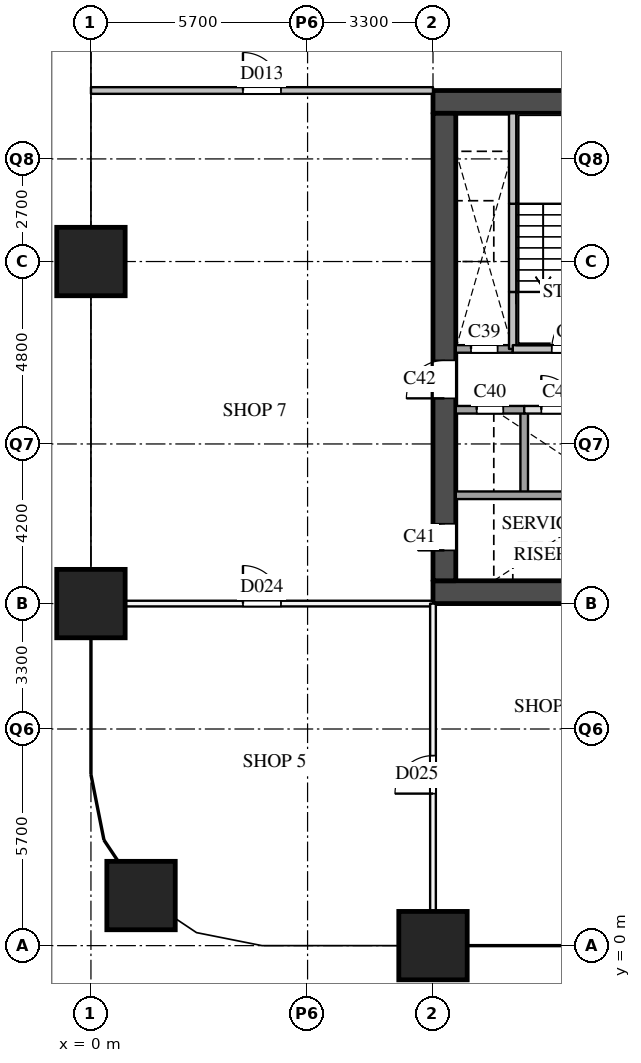
"""IFC4 building model, lengths in metres.
Left out: names, types, materials, properties, quantities, classifications, styles, units other than length and angle.
Written with IfcOpenShell. Run it as: python <this file> out.ifc"""

import sys

from ifc_helpers import new_model, si_unit, direction, frame, frame_2d, origin, origin_2d, place, context, subcontext, project, spatial, rectangle, extrude, element, fill, save


model = new_model("IFC4")
c1 = context("Model", 3, precision=1e-05, world=origin(), true_north=direction((0.0, 1.0)))
c2 = subcontext(c1, "Body", "Model", "MODEL_VIEW")
j1 = project(units=[si_unit("LENGTHUNIT", "METRE"), si_unit("PLANEANGLEUNIT", "RADIAN")], contexts=[c1])
p1 = place(None, origin())
s1 = spatial("IfcSite", under=j1, at=p1, CompositionType="ELEMENT")
p2 = place(p1, origin())
s2 = spatial("IfcBuilding", under=s1, at=p2, CompositionType="ELEMENT")
p3 = place(p2, frame((0.0, 0.0, 8.0)))
s3 = spatial("IfcBuildingStorey", under=s2, at=p3, CompositionType="ELEMENT", Elevation=8.0)
for number, where, z_axis, x_axis in (
    (1, (1.318, 1.318, 0.0), (0.0, 0.0, 1.0), (1.0, 0.0, 0.0)),
    (2, (0.0, 9.0, 0.0), (0.0, 0.0, 1.0), (1.0, 0.0, 0.0)),
    (3, (0.0, 18.0, 0.0), (0.0, 0.0, 1.0), (1.0, 0.0, 0.0)),
    (4, (9.0, 0.0, 0.0), (0.0, 0.0, 1.0), (1.0, 0.0, 0.0)),
):
    element("IfcColumn", number, at=place(p3, frame(where, z_axis=z_axis, x_axis=x_axis)), inside=s3, PredefinedType="COLUMN", context=c2, shape_type="SweptSolid", body=[
        extrude(rectangle(XDim=1.8, YDim=1.8, at=origin_2d()), origin(), (0.0, 0.0, 1.0), 6.0),
    ])
for number, where, z_axis, x_axis in (
    (5, (9.0, 9.3, 0.0), (0.0, 0.0, 1.0), (1.0, 0.0, 0.0)),
    (6, (9.0, 22.2, 0.0), (0.0, 0.0, 1.0), (1.0, 0.0, 0.0)),
):
    element("IfcWall", number, at=place(p3, frame(where, z_axis=z_axis, x_axis=x_axis)), inside=s3, PredefinedType="SHEAR", context=c2, shape_type="SweptSolid", body=[
        extrude(rectangle(XDim=9.0, YDim=0.6, at=frame_2d((4.5, 0.0))), origin(), (0.0, 0.0, 1.0), 5.59),
    ])
p4 = place(p3, frame((9.3, 9.6, 0.0), z_axis=(0.0, 0.0, 1.0), x_axis=(0.0, 1.0, 0.0)))
e7 = element("IfcWall", 7, at=p4, inside=s3, PredefinedType="SHEAR", context=c2, shape_type="SweptSolid", body=[
    extrude(rectangle(XDim=12.3, YDim=0.6, at=frame_2d((6.15, 0.0))), origin(), (0.0, 0.0, 1.0), 5.59),
])
p5 = place(p4, frame((0.8, 0.0, 0.0)))
e8 = element("IfcOpeningElement", 8, at=p5, cuts=e7, PredefinedType="OPENING", context=c2, shape_type="SweptSolid", body=[
    extrude(rectangle(XDim=0.7, YDim=2.1, at=frame_2d((0.35, 1.05))), frame((0.0, 0.31, 0.0), z_axis=(0.0, -1.0, 0.0), x_axis=(1.0, 0.0, 0.0)), (0.0, 0.0, 1.0), 0.62),
])
p6 = place(p4, frame((4.8, 0.0, 0.0)))
e9 = element("IfcOpeningElement", 9, at=p6, cuts=e7, PredefinedType="OPENING", context=c2, shape_type="SweptSolid", body=[
    extrude(rectangle(XDim=1.0, YDim=2.1, at=frame_2d((0.5, 1.05))), frame((0.0, 0.31, 0.0), z_axis=(0.0, -1.0, 0.0), x_axis=(1.0, 0.0, 0.0)), (0.0, 0.0, 1.0), 0.62),
])
p7 = place(p3, frame((11.1, 15.7, 0.0), z_axis=(0.0, 0.0, 1.0), x_axis=(0.0, 1.0, 0.0)))
e10 = element("IfcWall", 10, at=p7, inside=s3, PredefinedType="SOLIDWALL", context=c2, shape_type="SweptSolid", body=[
    extrude(rectangle(XDim=1.5, YDim=0.2, at=frame_2d((0.75, 0.0))), origin(), (0.0, 0.0, 1.0), 5.59),
])
p8 = place(p3, frame((11.1, 17.2, 0.0), z_axis=(0.0, 0.0, 1.0), x_axis=(0.0, 1.0, 0.0)))
e11 = element("IfcWall", 11, at=p8, inside=s3, PredefinedType="SOLIDWALL", context=c2, shape_type="SweptSolid", body=[
    extrude(rectangle(XDim=2.32, YDim=0.2, at=frame_2d((1.16, 0.0))), origin(), (0.0, 0.0, 1.0), 5.59),
])
p9 = place(p3, frame((11.1, 19.52, 0.0), z_axis=(0.0, 0.0, 1.0), x_axis=(0.0, 1.0, 0.0)))
e12 = element("IfcWall", 12, at=p9, inside=s3, PredefinedType="SOLIDWALL", context=c2, shape_type="SweptSolid", body=[
    extrude(rectangle(XDim=2.38, YDim=0.2, at=frame_2d((1.19, 0.0))), origin(), (0.0, 0.0, 1.0), 5.59),
])
p10 = place(p3, frame((11.4, 11.9, 0.0), z_axis=(0.0, 0.0, 1.0), x_axis=(0.0, 1.0, 0.0)))
e13 = element("IfcWall", 13, at=p10, inside=s3, PredefinedType="SOLIDWALL", context=c2, shape_type="SweptSolid", body=[
    extrude(rectangle(XDim=2.2, YDim=0.2, at=frame_2d((1.1, 0.0))), origin(), (0.0, 0.0, 1.0), 5.59),
])
p11 = place(p3, frame((9.6, 11.85, 0.0), z_axis=(0.0, 0.0, 1.0), x_axis=(1.0, 0.0, 0.0)))
e14 = element("IfcWall", 14, at=p11, inside=s3, PredefinedType="SOLIDWALL", context=c2, shape_type="SweptSolid", body=[
    extrude(rectangle(XDim=7.8, YDim=0.2, at=frame_2d((3.9, 0.0))), origin(), (0.0, 0.0, 1.0), 5.59),
])
p12 = place(p3, frame((11.4, 14.1, 0.0), z_axis=(0.0, 0.0, 1.0), x_axis=(1.0, 0.0, 0.0)))
e15 = element("IfcWall", 15, at=p12, inside=s3, PredefinedType="PARTITIONING", context=c2, shape_type="SweptSolid", body=[
    extrude(rectangle(XDim=6.0, YDim=0.2, at=frame_2d((3.0, 0.0))), origin(), (0.0, 0.0, 1.0), 5.59),
])
p13 = place(p12, frame((0.45, 0.0, 0.0)))
e16 = element("IfcOpeningElement", 16, at=p13, cuts=e15, PredefinedType="OPENING", context=c2, shape_type="SweptSolid", body=[
    extrude(rectangle(XDim=0.9, YDim=2.1, at=frame_2d((0.45, 1.05))), frame((0.0, 0.11, 0.0), z_axis=(0.0, -1.0, 0.0), x_axis=(1.0, 0.0, 0.0)), (0.0, 0.0, 1.0), 0.22),
])
p14 = place(p12, frame((3.45, 0.0, 0.0)))
e17 = element("IfcOpeningElement", 17, at=p14, cuts=e15, PredefinedType="OPENING", context=c2, shape_type="SweptSolid", body=[
    extrude(rectangle(XDim=0.9, YDim=2.1, at=frame_2d((0.45, 1.05))), frame((0.0, 0.11, 0.0), z_axis=(0.0, -1.0, 0.0), x_axis=(1.0, 0.0, 0.0)), (0.0, 0.0, 1.0), 0.22),
])
p15 = place(p3, frame((9.6, 14.1, 0.0), z_axis=(0.0, 0.0, 1.0), x_axis=(1.0, 0.0, 0.0)))
e18 = element("IfcWall", 18, at=p15, inside=s3, PredefinedType="SOLIDWALL", context=c2, shape_type="SweptSolid", body=[
    extrude(rectangle(XDim=1.8, YDim=0.2, at=frame_2d((0.9, 0.0))), origin(), (0.0, 0.0, 1.0), 5.59),
])
p16 = place(p15, frame((0.55, 0.0, 0.0)))
e19 = element("IfcOpeningElement", 19, at=p16, cuts=e18, PredefinedType="OPENING", context=c2, shape_type="SweptSolid", body=[
    extrude(rectangle(XDim=0.7, YDim=2.1, at=frame_2d((0.35, 1.05))), frame((0.0, 0.11, 0.0), z_axis=(0.0, -1.0, 0.0), x_axis=(1.0, 0.0, 0.0)), (0.0, 0.0, 1.0), 0.22),
])
p17 = place(p3, frame((9.6, 15.7, 0.0), z_axis=(0.0, 0.0, 1.0), x_axis=(1.0, 0.0, 0.0)))
e20 = element("IfcWall", 20, at=p17, inside=s3, PredefinedType="SOLIDWALL", context=c2, shape_type="SweptSolid", body=[
    extrude(rectangle(XDim=1.5, YDim=0.2, at=frame_2d((0.75, 0.0))), origin(), (0.0, 0.0, 1.0), 5.59),
])
p18 = place(p17, frame((0.4, 0.0, 0.0)))
e21 = element("IfcOpeningElement", 21, at=p18, cuts=e20, PredefinedType="OPENING", context=c2, shape_type="SweptSolid", body=[
    extrude(rectangle(XDim=0.7, YDim=2.1, at=frame_2d((0.35, 1.05))), frame((0.0, 0.11, 0.0), z_axis=(0.0, -1.0, 0.0), x_axis=(1.0, 0.0, 0.0)), (0.0, 0.0, 1.0), 0.22),
])
p19 = place(p3, frame((11.1, 15.7, 0.0), z_axis=(0.0, 0.0, 1.0), x_axis=(1.0, 0.0, 0.0)))
e22 = element("IfcWall", 22, at=p19, inside=s3, PredefinedType="SOLIDWALL", context=c2, shape_type="SweptSolid", body=[
    extrude(rectangle(XDim=3.05, YDim=0.2, at=frame_2d((1.525, 0.0))), origin(), (0.0, 0.0, 1.0), 5.59),
])
p20 = place(p19, frame((1.025, 0.0, 0.0)))
e23 = element("IfcOpeningElement", 23, at=p20, cuts=e22, PredefinedType="OPENING", context=c2, shape_type="SweptSolid", body=[
    extrude(rectangle(XDim=1.1, YDim=2.1, at=frame_2d((0.55, 1.05))), frame((0.0, 0.11, 0.0), z_axis=(0.0, -1.0, 0.0), x_axis=(1.0, 0.0, 0.0)), (0.0, 0.0, 1.0), 0.22),
])
p21 = place(p3, frame((0.0, 22.5, 0.0), z_axis=(0.0, 0.0, 1.0), x_axis=(1.0, 0.0, 0.0)))
e24 = element("IfcWall", 24, at=p21, inside=s3, PredefinedType="PARTITIONING", context=c2, shape_type="SweptSolid", body=[
    extrude(rectangle(XDim=9.0, YDim=0.175, at=frame_2d((4.5, 0.0))), origin(), (0.0, 0.0, 1.0), 4.59),
])
p22 = place(p21, frame((4.0, 0.0, 0.0)))
e25 = element("IfcOpeningElement", 25, at=p22, cuts=e24, PredefinedType="OPENING", context=c2, shape_type="SweptSolid", body=[
    extrude(rectangle(XDim=1.0, YDim=2.1, at=frame_2d((0.5, 1.05))), frame((0.0, 0.097, 0.0), z_axis=(0.0, -1.0, 0.0), x_axis=(1.0, 0.0, 0.0)), (0.0, 0.0, 1.0), 0.195),
])
p23 = place(p3, frame((0.0, 9.0, 0.0), z_axis=(0.0, 0.0, 1.0), x_axis=(1.0, 0.0, 0.0)))
e26 = element("IfcWall", 26, at=p23, inside=s3, PredefinedType="PARTITIONING", context=c2, shape_type="SweptSolid", body=[
    extrude(rectangle(XDim=9.0, YDim=0.15, at=frame_2d((4.5, 0.0))), origin(), (0.0, 0.0, 1.0), 5.59),
])
p24 = place(p23, frame((4.0, 0.0, 0.0)))
e27 = element("IfcOpeningElement", 27, at=p24, cuts=e26, PredefinedType="OPENING", context=c2, shape_type="SweptSolid", body=[
    extrude(rectangle(XDim=1.0, YDim=2.1, at=frame_2d((0.5, 1.05))), frame((0.0, 0.085, 0.0), z_axis=(0.0, -1.0, 0.0), x_axis=(1.0, 0.0, 0.0)), (0.0, 0.0, 1.0), 0.17),
])
p25 = place(p3, frame((9.0, 0.0, 0.0), z_axis=(0.0, 0.0, 1.0), x_axis=(0.0, 1.0, 0.0)))
e28 = element("IfcWall", 28, at=p25, inside=s3, PredefinedType="PARTITIONING", context=c2, shape_type="SweptSolid", body=[
    extrude(rectangle(XDim=9.0, YDim=0.15, at=frame_2d((4.5, 0.0))), origin(), (0.0, 0.0, 1.0), 5.59),
])
p26 = place(p25, frame((4.0, 0.0, 0.0)))
e29 = element("IfcOpeningElement", 29, at=p26, cuts=e28, PredefinedType="OPENING", context=c2, shape_type="SweptSolid", body=[
    extrude(rectangle(XDim=1.0, YDim=2.1, at=frame_2d((0.5, 1.05))), frame((0.0, 0.085, 0.0), z_axis=(0.0, -1.0, 0.0), x_axis=(1.0, 0.0, 0.0)), (0.0, 0.0, 1.0), 0.17),
])
p27 = place(p20, origin())
e30 = element("IfcDoor", 30, at=p27, inside=s3, OperationType="SINGLE_SWING_RIGHT", PredefinedType="DOOR", context=c2, shape_type="SweptSolid", body=[
    extrude(rectangle(XDim=1.1, YDim=2.1, at=frame_2d((0.55, 1.05))), frame((0.0, 0.025, 0.0), z_axis=(0.0, -1.0, 0.0), x_axis=(1.0, 0.0, 0.0)), (0.0, 0.0, 1.0), 0.05),
])
fill(e23, e30)
p28 = place(p18, origin())
e31 = element("IfcDoor", 31, at=p28, inside=s3, OperationType="SINGLE_SWING_LEFT", PredefinedType="DOOR", context=c2, shape_type="SweptSolid", body=[
    extrude(rectangle(XDim=0.7, YDim=2.1, at=frame_2d((0.35, 1.05))), frame((0.0, 0.025, 0.0), z_axis=(0.0, -1.0, 0.0), x_axis=(1.0, 0.0, 0.0)), (0.0, 0.0, 1.0), 0.05),
])
fill(e21, e31)
p29 = place(p16, origin())
e32 = element("IfcDoor", 32, at=p29, inside=s3, OperationType="SINGLE_SWING_LEFT", PredefinedType="DOOR", context=c2, shape_type="SweptSolid", body=[
    extrude(rectangle(XDim=0.7, YDim=2.1, at=frame_2d((0.35, 1.05))), frame((0.0, 0.025, 0.0), z_axis=(0.0, -1.0, 0.0), x_axis=(1.0, 0.0, 0.0)), (0.0, 0.0, 1.0), 0.05),
])
fill(e19, e32)
p30 = place(p5, origin())
e33 = element("IfcDoor", 33, at=p30, inside=s3, OperationType="SINGLE_SWING_LEFT", PredefinedType="DOOR", context=c2, shape_type="SweptSolid", body=[
    extrude(rectangle(XDim=0.7, YDim=2.1, at=frame_2d((0.35, 1.05))), frame((0.0, 0.025, 0.0), z_axis=(0.0, -1.0, 0.0), x_axis=(1.0, 0.0, 0.0)), (0.0, 0.0, 1.0), 0.05),
])
fill(e8, e33)
p31 = place(p6, origin())
e34 = element("IfcDoor", 34, at=p31, inside=s3, OperationType="SINGLE_SWING_LEFT", PredefinedType="DOOR", context=c2, shape_type="SweptSolid", body=[
    extrude(rectangle(XDim=1.0, YDim=2.1, at=frame_2d((0.5, 1.05))), frame((0.0, 0.025, 0.0), z_axis=(0.0, -1.0, 0.0), x_axis=(1.0, 0.0, 0.0)), (0.0, 0.0, 1.0), 0.05),
])
fill(e9, e34)
p32 = place(p13, origin())
e35 = element("IfcDoor", 35, at=p32, inside=s3, OperationType="SINGLE_SWING_LEFT", PredefinedType="DOOR", context=c2, shape_type="SweptSolid", body=[
    extrude(rectangle(XDim=0.9, YDim=2.1, at=frame_2d((0.45, 1.05))), frame((0.0, 0.025, 0.0), z_axis=(0.0, -1.0, 0.0), x_axis=(1.0, 0.0, 0.0)), (0.0, 0.0, 1.0), 0.05),
])
fill(e16, e35)
p33 = place(p22, origin())
e36 = element("IfcDoor", 36, at=p33, inside=s3, OperationType="SINGLE_SWING_LEFT", PredefinedType="DOOR", context=c2, shape_type="SweptSolid", body=[
    extrude(rectangle(XDim=1.0, YDim=2.1, at=frame_2d((0.5, 1.05))), frame((0.0, 0.025, 0.0), z_axis=(0.0, -1.0, 0.0), x_axis=(1.0, 0.0, 0.0)), (0.0, 0.0, 1.0), 0.05),
])
fill(e25, e36)
p34 = place(p24, origin())
e37 = element("IfcDoor", 37, at=p34, inside=s3, OperationType="SINGLE_SWING_LEFT", PredefinedType="DOOR", context=c2, shape_type="SweptSolid", body=[
    extrude(rectangle(XDim=1.0, YDim=2.1, at=frame_2d((0.5, 1.05))), frame((0.0, 0.025, 0.0), z_axis=(0.0, -1.0, 0.0), x_axis=(1.0, 0.0, 0.0)), (0.0, 0.0, 1.0), 0.05),
])
fill(e27, e37)
p35 = place(p26, origin())
e38 = element("IfcDoor", 38, at=p35, inside=s3, OperationType="SINGLE_SWING_LEFT", PredefinedType="DOOR", context=c2, shape_type="SweptSolid", body=[
    extrude(rectangle(XDim=1.0, YDim=2.1, at=frame_2d((0.5, 1.05))), frame((0.0, 0.025, 0.0), z_axis=(0.0, -1.0, 0.0), x_axis=(1.0, 0.0, 0.0)), (0.0, 0.0, 1.0), 0.05),
])
fill(e29, e38)
save(model, sys.argv[1])
